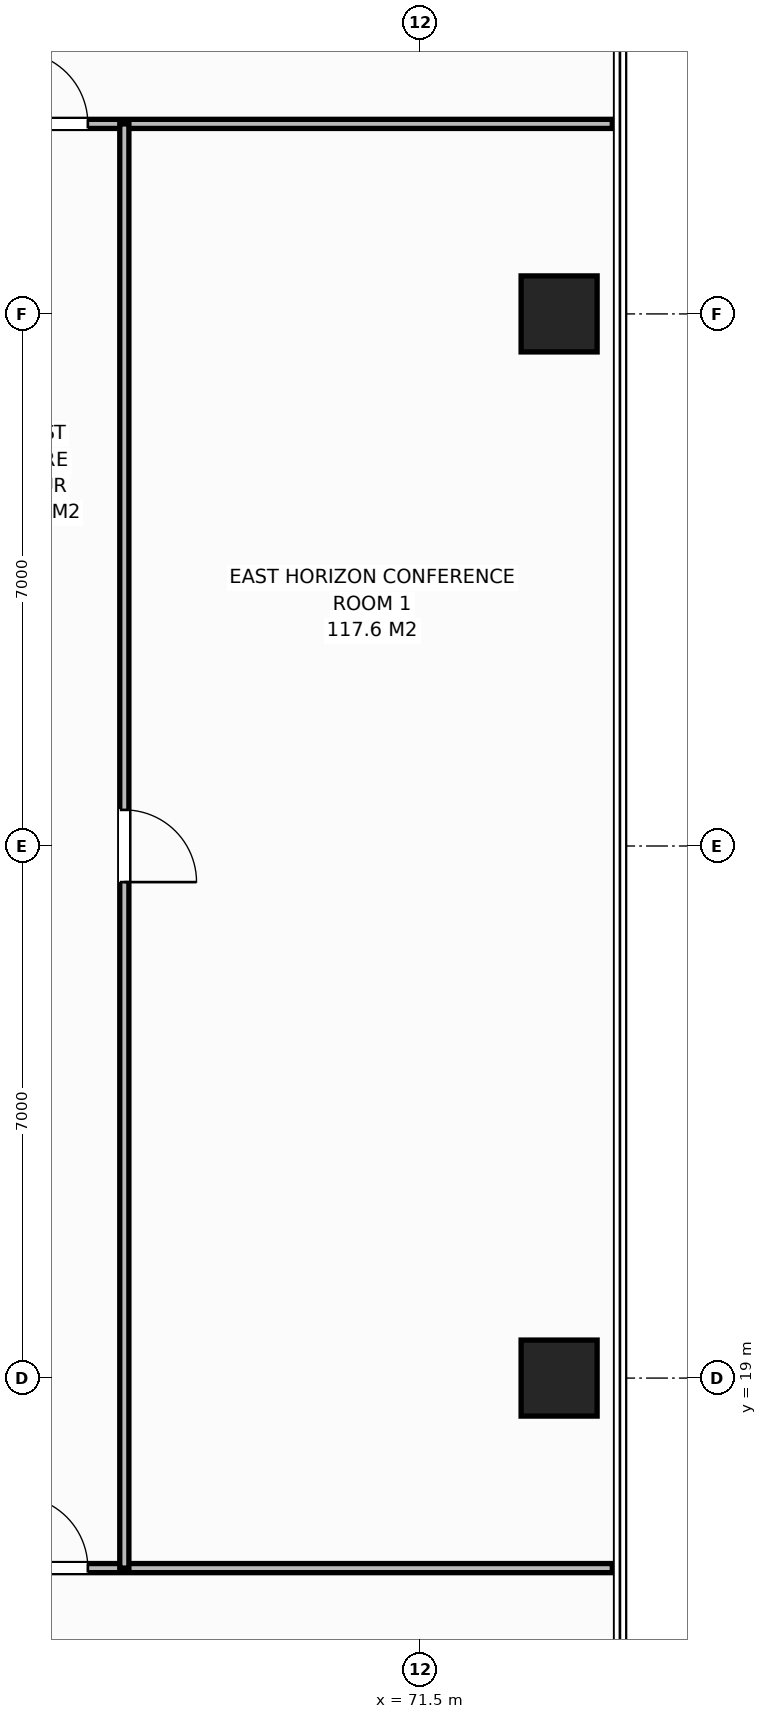
"""IFC4 building model, lengths in metres.
Left out: names, types, materials, properties, quantities, classifications, styles, units other than length and angle.
Written with IfcOpenShell. Run it as: python <this file> out.ifc"""

import sys

from ifc_helpers import new_model, si_unit, direction, frame, frame_2d, origin, origin_2d, place, context, subcontext, project, spatial, rectangle, extrude, element, fill, save


model = new_model("IFC4")
c1 = context("Model", 3, precision=1e-05, world=origin(), true_north=direction((0.0, 1.0)))
c2 = subcontext(c1, "Body", "Model", "MODEL_VIEW")
j1 = project(units=[si_unit("LENGTHUNIT", "METRE"), si_unit("PLANEANGLEUNIT", "RADIAN")], contexts=[c1])
p1 = place(None, origin())
s1 = spatial("IfcSite", under=j1, at=p1, CompositionType="ELEMENT")
p2 = place(p1, origin())
s2 = spatial("IfcBuilding", under=s1, at=p2, CompositionType="ELEMENT")
p3 = place(p2, frame((0.0, 0.0, 174.6)))
s3 = spatial("IfcBuildingStorey", under=s2, at=p3, CompositionType="ELEMENT", Elevation=174.6)
for number, where, z_axis, x_axis in (
    (1, (73.32, 19.0, 0.0), (0.0, 0.0, 1.0), (1.0, 0.0, 0.0)),
    (2, (73.32, 33.0, 0.0), (0.0, 0.0, 1.0), (1.0, 0.0, 0.0)),
):
    element("IfcColumn", number, at=place(p3, frame(where, z_axis=z_axis, x_axis=x_axis)), inside=s3, PredefinedType="COLUMN", context=c2, shape_type="SweptSolid", body=[
        extrude(rectangle(XDim=1.0, YDim=1.0, at=origin_2d()), origin(), (0.0, 0.0, 1.0), 3.8),
    ])
p4 = place(p3, frame((63.903, 35.5, 0.0), z_axis=(0.0, 0.0, 1.0), x_axis=(1.0, 0.0, 0.0)))
e3 = element("IfcWall", 3, at=p4, inside=s3, PredefinedType="PARTITIONING", context=c2, shape_type="SweptSolid", body=[
    extrude(rectangle(XDim=10.117, YDim=0.12, at=frame_2d((5.058, 0.0))), origin(), (0.0, 0.0, 1.0), 3.572),
])
p5 = place(p4, frame((2.267, 0.0, 0.0)))
e4 = element("IfcOpeningElement", 4, at=p5, cuts=e3, PredefinedType="OPENING", context=c2, shape_type="SweptSolid", body=[
    extrude(rectangle(XDim=0.95, YDim=2.15, at=frame_2d((0.475, 1.075))), frame((0.0, 0.07, 0.0), z_axis=(0.0, -1.0, 0.0), x_axis=(1.0, 0.0, 0.0)), (0.0, 0.0, 1.0), 0.14),
])
p6 = place(p3, frame((64.86, 16.5, 0.0), z_axis=(0.0, 0.0, 1.0), x_axis=(1.0, 0.0, 0.0)))
e5 = element("IfcWall", 5, at=p6, inside=s3, PredefinedType="PARTITIONING", context=c2, shape_type="SweptSolid", body=[
    extrude(rectangle(XDim=9.16, YDim=0.12, at=frame_2d((4.58, 0.0))), origin(), (0.0, 0.0, 1.0), 3.572),
])
p7 = place(p6, frame((1.31, 0.0, 0.0)))
e6 = element("IfcOpeningElement", 6, at=p7, cuts=e5, PredefinedType="OPENING", context=c2, shape_type="SweptSolid", body=[
    extrude(rectangle(XDim=0.95, YDim=2.15, at=frame_2d((0.475, 1.075))), frame((0.0, 0.07, 0.0), z_axis=(0.0, -1.0, 0.0), x_axis=(1.0, 0.0, 0.0)), (0.0, 0.0, 1.0), 0.14),
])
p8 = place(p3, frame((67.6, 16.5, 0.0), z_axis=(0.0, 0.0, 1.0), x_axis=(0.0, 1.0, 0.0)))
e7 = element("IfcWall", 7, at=p8, inside=s3, PredefinedType="PARTITIONING", context=c2, shape_type="SweptSolid", body=[
    extrude(rectangle(XDim=19.0, YDim=0.12, at=frame_2d((9.5, 0.0))), origin(), (0.0, 0.0, 1.0), 3.572),
])
p9 = place(p8, frame((9.025, 0.0, 0.0)))
e8 = element("IfcOpeningElement", 8, at=p9, cuts=e7, PredefinedType="OPENING", context=c2, shape_type="SweptSolid", body=[
    extrude(rectangle(XDim=0.95, YDim=2.15, at=frame_2d((0.475, 1.075))), frame((0.0, 0.07, 0.0), z_axis=(0.0, -1.0, 0.0), x_axis=(1.0, 0.0, 0.0)), (0.0, 0.0, 1.0), 0.14),
])
p10 = place(p5, origin())
e9 = element("IfcDoor", 9, at=p10, inside=s3, OperationType="SINGLE_SWING_LEFT", PredefinedType="DOOR", context=c2, shape_type="SweptSolid", body=[
    extrude(rectangle(XDim=0.95, YDim=2.15, at=frame_2d((0.475, 1.075))), frame((0.0, 0.025, 0.0), z_axis=(0.0, -1.0, 0.0), x_axis=(1.0, 0.0, 0.0)), (0.0, 0.0, 1.0), 0.05),
])
fill(e4, e9)
p11 = place(p7, origin())
e10 = element("IfcDoor", 10, at=p11, inside=s3, OperationType="SINGLE_SWING_LEFT", PredefinedType="DOOR", context=c2, shape_type="SweptSolid", body=[
    extrude(rectangle(XDim=0.95, YDim=2.15, at=frame_2d((0.475, 1.075))), frame((0.0, 0.025, 0.0), z_axis=(0.0, -1.0, 0.0), x_axis=(1.0, 0.0, 0.0)), (0.0, 0.0, 1.0), 0.05),
])
fill(e6, e10)
p12 = place(p9, origin())
e11 = element("IfcDoor", 11, at=p12, inside=s3, OperationType="SINGLE_SWING_RIGHT", PredefinedType="DOOR", context=c2, shape_type="SweptSolid", body=[
    extrude(rectangle(XDim=0.95, YDim=2.15, at=frame_2d((0.475, 1.075))), frame((0.0, 0.025, 0.0), z_axis=(0.0, -1.0, 0.0), x_axis=(1.0, 0.0, 0.0)), (0.0, 0.0, 1.0), 0.05),
])
fill(e8, e11)
save(model, sys.argv[1])
